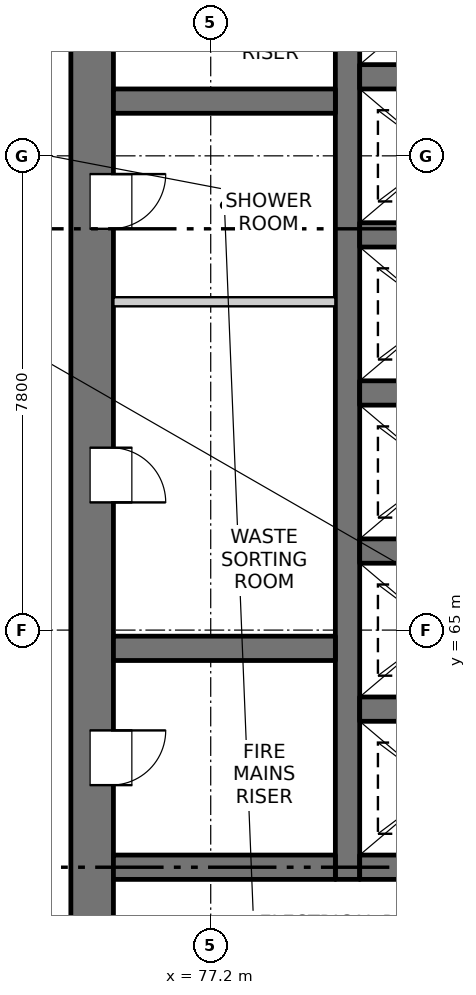
"""IFC4 building model, lengths in metres.
Left out: names, types, materials, properties, quantities, classifications, styles, units other than length and angle.
Written with IfcOpenShell. Run it as: python <this file> out.ifc"""

import sys

from ifc_helpers import new_model, si_unit, direction, frame, frame_2d, origin, place, context, subcontext, project, spatial, rectangle, extrude, element, fill, save


model = new_model("IFC4")
c1 = context("Model", 3, precision=1e-05, world=origin(), true_north=direction((0.0, 1.0)))
c2 = subcontext(c1, "Body", "Model", "MODEL_VIEW")
j1 = project(units=[si_unit("LENGTHUNIT", "METRE"), si_unit("PLANEANGLEUNIT", "RADIAN")], contexts=[c1])
p1 = place(None, origin())
s1 = spatial("IfcSite", under=j1, at=p1, CompositionType="ELEMENT")
p2 = place(p1, origin())
s2 = spatial("IfcBuilding", under=s1, at=p2, CompositionType="ELEMENT")
p3 = place(p2, frame((0.0, 0.0, 58.0)))
s3 = spatial("IfcBuildingStorey", under=s2, at=p3, CompositionType="ELEMENT", Elevation=58.0)
p4 = place(p3, frame((75.25, 54.9, -0.25), z_axis=(0.0, 0.0, 1.0), x_axis=(0.0, 1.0, 0.0)))
e1 = element("IfcWall", 1, at=p4, inside=s3, PredefinedType="SOLIDWALL", context=c2, shape_type="SweptSolid", body=[
    extrude(rectangle(XDim=22.4, YDim=0.7, at=frame_2d((11.2, 0.0))), origin(), (0.0, 0.0, 1.0), 3.4),
])
p5 = place(p4, frame((7.55, 0.0, 0.25)))
e2 = element("IfcOpeningElement", 2, at=p5, cuts=e1, PredefinedType="OPENING", context=c2, shape_type="SweptSolid", body=[
    extrude(rectangle(XDim=0.9, YDim=2.1, at=frame_2d((0.45, 1.05))), frame((0.0, 0.36, 0.0), z_axis=(0.0, -1.0, 0.0), x_axis=(1.0, 0.0, 0.0)), (0.0, 0.0, 1.0), 0.72),
])
p6 = place(p4, frame((12.2, 0.0, 0.25)))
e3 = element("IfcOpeningElement", 3, at=p6, cuts=e1, PredefinedType="OPENING", context=c2, shape_type="SweptSolid", body=[
    extrude(rectangle(XDim=0.9, YDim=2.1, at=frame_2d((0.45, 1.05))), frame((0.0, 0.36, 0.0), z_axis=(0.0, -1.0, 0.0), x_axis=(1.0, 0.0, 0.0)), (0.0, 0.0, 1.0), 0.72),
])
p7 = place(p4, frame((16.7, 0.0, 0.25)))
e4 = element("IfcOpeningElement", 4, at=p7, cuts=e1, PredefinedType="OPENING", context=c2, shape_type="SweptSolid", body=[
    extrude(rectangle(XDim=0.9, YDim=2.1, at=frame_2d((0.45, 1.05))), frame((0.0, 0.36, 0.0), z_axis=(0.0, -1.0, 0.0), x_axis=(1.0, 0.0, 0.0)), (0.0, 0.0, 1.0), 0.72),
])
p8 = place(p4, frame((20.15, 0.0, 0.25)))
e5 = element("IfcOpeningElement", 5, at=p8, cuts=e1, PredefinedType="OPENING", context=c2, shape_type="SweptSolid", body=[
    extrude(rectangle(XDim=0.9, YDim=2.1, at=frame_2d((0.45, 1.05))), frame((0.0, 0.36, 0.0), z_axis=(0.0, -1.0, 0.0), x_axis=(1.0, 0.0, 0.0)), (0.0, 0.0, 1.0), 0.72),
])
p9 = place(p3, frame((79.45, 60.9, -0.25), z_axis=(0.0, 0.0, 1.0), x_axis=(0.0, 1.0, 0.0)))
e6 = element("IfcWall", 6, at=p9, inside=s3, PredefinedType="SOLIDWALL", context=c2, shape_type="SweptSolid", body=[
    extrude(rectangle(XDim=16.4, YDim=0.4, at=frame_2d((8.2, 0.0))), origin(), (0.0, 0.0, 1.0), 3.4),
])
for number, where, z_axis, x_axis in (
    (7, (79.65, 61.1, -0.25), (0.0, 0.0, 1.0), (1.0, 0.0, 0.0)),
    (8, (79.65, 63.7, -0.25), (0.0, 0.0, 1.0), (1.0, 0.0, 0.0)),
    (9, (79.65, 66.3, -0.25), (0.0, 0.0, 1.0), (1.0, 0.0, 0.0)),
    (10, (79.65, 68.9, -0.25), (0.0, 0.0, 1.0), (1.0, 0.0, 0.0)),
    (11, (79.65, 71.5, -0.25), (0.0, 0.0, 1.0), (1.0, 0.0, 0.0)),
    (12, (79.65, 74.1, -0.25), (0.0, 0.0, 1.0), (1.0, 0.0, 0.0)),
):
    element("IfcWall", number, at=place(p3, frame(where, z_axis=z_axis, x_axis=x_axis)), inside=s3, PredefinedType="SOLIDWALL", context=c2, shape_type="SweptSolid", body=[
        extrude(rectangle(XDim=3.0, YDim=0.4, at=frame_2d((1.5, 0.0))), origin(), (0.0, 0.0, 1.0), 3.4),
    ])
for number, where, z_axis, x_axis in (
    (13, (75.6, 61.1, -0.25), (0.0, 0.0, 1.0), (1.0, 0.0, 0.0)),
    (14, (75.6, 64.7, -0.25), (0.0, 0.0, 1.0), (1.0, 0.0, 0.0)),
    (15, (75.6, 73.7, -0.25), (0.0, 0.0, 1.0), (1.0, 0.0, 0.0)),
):
    element("IfcWall", number, at=place(p3, frame(where, z_axis=z_axis, x_axis=x_axis)), inside=s3, PredefinedType="SOLIDWALL", context=c2, shape_type="SweptSolid", body=[
        extrude(rectangle(XDim=3.65, YDim=0.4, at=frame_2d((1.825, 0.0))), origin(), (0.0, 0.0, 1.0), 3.4),
    ])
p10 = place(p3, frame((75.6, 70.4, 0.0), z_axis=(0.0, 0.0, 1.0), x_axis=(1.0, 0.0, 0.0)))
e16 = element("IfcWall", 16, at=p10, inside=s3, PredefinedType="PARTITIONING", context=c2, shape_type="SweptSolid", body=[
    extrude(rectangle(XDim=3.65, YDim=0.15, at=frame_2d((1.825, 0.0))), origin(), (0.0, 0.0, 1.0), 3.15),
])
p11 = place(p5, origin())
e17 = element("IfcDoor", 17, at=p11, inside=s3, OperationType="SINGLE_SWING_LEFT", PredefinedType="DOOR", context=c2, shape_type="SweptSolid", body=[
    extrude(rectangle(XDim=0.9, YDim=2.1, at=frame_2d((0.45, 1.05))), frame((0.0, -0.285, 0.0), z_axis=(0.0, -1.0, 0.0), x_axis=(1.0, 0.0, 0.0)), (0.0, 0.0, 1.0), 0.05),
])
fill(e2, e17)
p12 = place(p6, origin())
e18 = element("IfcDoor", 18, at=p12, inside=s3, OperationType="SINGLE_SWING_RIGHT", PredefinedType="DOOR", context=c2, shape_type="SweptSolid", body=[
    extrude(rectangle(XDim=0.9, YDim=2.1, at=frame_2d((0.45, 1.05))), frame((0.0, -0.285, 0.0), z_axis=(0.0, -1.0, 0.0), x_axis=(1.0, 0.0, 0.0)), (0.0, 0.0, 1.0), 0.05),
])
fill(e3, e18)
p13 = place(p7, origin())
e19 = element("IfcDoor", 19, at=p13, inside=s3, OperationType="SINGLE_SWING_LEFT", PredefinedType="DOOR", context=c2, shape_type="SweptSolid", body=[
    extrude(rectangle(XDim=0.9, YDim=2.1, at=frame_2d((0.45, 1.05))), frame((0.0, -0.285, 0.0), z_axis=(0.0, -1.0, 0.0), x_axis=(1.0, 0.0, 0.0)), (0.0, 0.0, 1.0), 0.05),
])
fill(e4, e19)
save(model, sys.argv[1])
